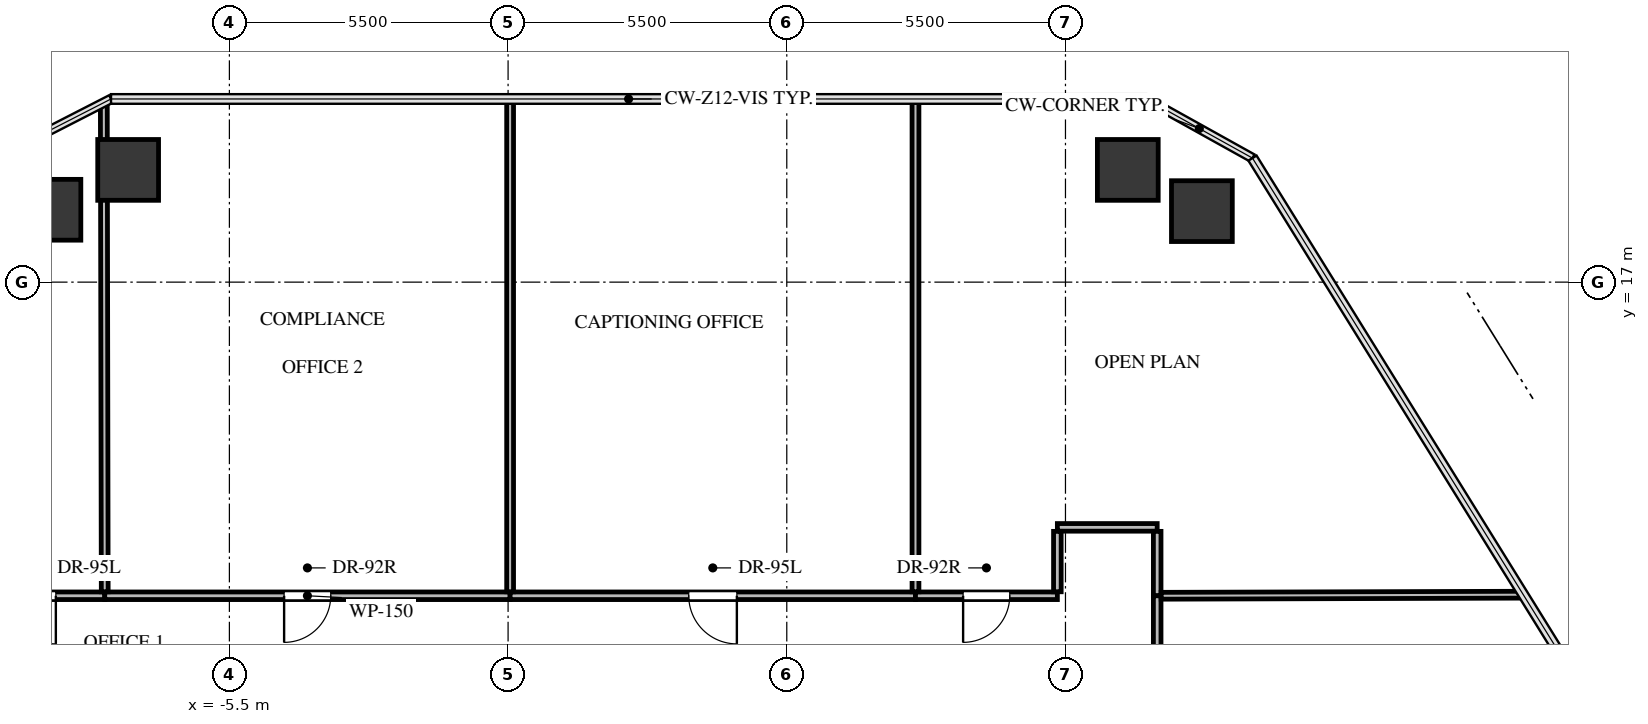
"""IFC4 building model, lengths in metres.
Left out: names, types, materials, properties, quantities, classifications, styles, units other than length and angle.
Written with IfcOpenShell. Run it as: python <this file> out.ifc"""

import sys

from ifc_helpers import new_model, si_unit, direction, frame, frame_2d, origin, origin_2d, place, context, subcontext, project, spatial, rectangle, extrude, source, transform, mapped, element, fill, save


model = new_model("IFC4")
c1 = context("Model", 3, precision=1e-05, world=origin(), true_north=direction((0.0, 1.0)))
c2 = subcontext(c1, "Body", "Model", "MODEL_VIEW")
j1 = project(units=[si_unit("LENGTHUNIT", "METRE"), si_unit("PLANEANGLEUNIT", "RADIAN")], contexts=[c1])
p1 = place(None, origin())
s1 = spatial("IfcSite", under=j1, at=p1, CompositionType="ELEMENT")
p2 = place(p1, origin())
s2 = spatial("IfcBuilding", under=s1, at=p2, CompositionType="ELEMENT")
p3 = place(p2, frame((0.0, 0.0, 146.1)))
s3 = spatial("IfcBuildingStorey", under=s2, at=p3, CompositionType="ELEMENT", Elevation=146.1)
m1 = source(origin(), c2, "Body", "SweptSolid", [
    extrude(rectangle(XDim=1.2, YDim=1.2, at=origin_2d()), origin(), (0.0, 0.0, 1.0), 4.12),
])
for number, where, z_axis, x_axis in (
    (1, (-9.032, 18.428, -0.24), (0.0, 0.0, 1.0), (1.0, 0.0, 0.0)),
    (2, (-7.498, 19.215, -0.24), (0.0, 0.0, 1.0), (1.0, 0.0, 0.0)),
    (3, (12.23, 19.215, -0.24), (0.0, 0.0, 1.0), (1.0, 0.0, 0.0)),
    (4, (13.692, 18.401, -0.24), (0.0, 0.0, 1.0), (1.0, 0.0, 0.0)),
):
    element("IfcColumn", number, at=place(p3, frame(where, z_axis=z_axis, x_axis=x_axis)), inside=s3, PredefinedType="COLUMN", context=c2, shape_type="MappedRepresentation", body=[
        mapped(m1, transform((0.0, 0.0, 0.0), x_axis=(1.0, 0.0, 0.0), y_axis=(0.0, 1.0, 0.0), z_axis=(0.0, 0.0, 1.0), scale=1.0)),
    ])
p4 = place(p3, frame((-7.96, 10.81, 0.0), z_axis=(0.0, 0.0, 1.0), x_axis=(-1.0, 0.0, 0.0)))
e5 = element("IfcWall", 5, at=p4, inside=s3, PredefinedType="PARTITIONING", context=c2, shape_type="SweptSolid", body=[
    extrude(rectangle(XDim=2.88, YDim=0.15, at=frame_2d((1.44, 0.0))), origin(), (0.0, 0.0, 1.0), 3.865),
])
p5 = place(p4, frame((0.965, 0.0, 0.0)))
e6 = element("IfcOpeningElement", 6, at=p5, cuts=e5, PredefinedType="OPENING", context=c2, shape_type="SweptSolid", body=[
    extrude(rectangle(XDim=0.95, YDim=2.1, at=frame_2d((0.475, 1.05))), frame((0.0, 0.085, 0.0), z_axis=(0.0, -1.0, 0.0), x_axis=(1.0, 0.0, 0.0)), (0.0, 0.0, 1.0), 0.17),
])
p6 = place(p3, frame((0.04, 10.81, 0.0), z_axis=(0.0, 0.0, 1.0), x_axis=(-1.0, 0.0, 0.0)))
e7 = element("IfcWall", 7, at=p6, inside=s3, PredefinedType="PARTITIONING", context=c2, shape_type="SweptSolid", body=[
    extrude(rectangle(XDim=8.0, YDim=0.15, at=frame_2d((4.0, 0.0))), origin(), (0.0, 0.0, 1.0), 2.3),
])
p7 = place(p6, frame((3.54, 0.0, 0.0)))
e8 = element("IfcOpeningElement", 8, at=p7, cuts=e7, PredefinedType="OPENING", context=c2, shape_type="SweptSolid", body=[
    extrude(rectangle(XDim=0.92, YDim=2.1, at=frame_2d((0.46, 1.05))), frame((0.0, 0.085, 0.0), z_axis=(0.0, -1.0, 0.0), x_axis=(1.0, 0.0, 0.0)), (0.0, 0.0, 1.0), 0.17),
])
p8 = place(p3, frame((8.04, 10.81, 0.0), z_axis=(0.0, 0.0, 1.0), x_axis=(-1.0, 0.0, 0.0)))
e9 = element("IfcWall", 9, at=p8, inside=s3, PredefinedType="PARTITIONING", context=c2, shape_type="SweptSolid", body=[
    extrude(rectangle(XDim=8.0, YDim=0.15, at=frame_2d((4.0, 0.0))), origin(), (0.0, 0.0, 1.0), 3.223),
])
p9 = place(p8, frame((3.525, 0.0, 0.0)))
e10 = element("IfcOpeningElement", 10, at=p9, cuts=e9, PredefinedType="OPENING", context=c2, shape_type="SweptSolid", body=[
    extrude(rectangle(XDim=0.95, YDim=2.1, at=frame_2d((0.475, 1.05))), frame((0.0, 0.085, 0.0), z_axis=(0.0, -1.0, 0.0), x_axis=(1.0, 0.0, 0.0)), (0.0, 0.0, 1.0), 0.17),
])
p10 = place(p3, frame((10.84, 10.81, 0.0), z_axis=(0.0, 0.0, 1.0), x_axis=(-1.0, 0.0, 0.0)))
e11 = element("IfcWall", 11, at=p10, inside=s3, PredefinedType="PARTITIONING", context=c2, shape_type="SweptSolid", body=[
    extrude(rectangle(XDim=2.8, YDim=0.15, at=frame_2d((1.4, 0.0))), origin(), (0.0, 0.0, 1.0), 2.3),
])
p11 = place(p10, frame((0.94, 0.0, 0.0)))
e12 = element("IfcOpeningElement", 12, at=p11, cuts=e11, PredefinedType="OPENING", context=c2, shape_type="SweptSolid", body=[
    extrude(rectangle(XDim=0.92, YDim=2.1, at=frame_2d((0.46, 1.05))), frame((0.0, 0.085, 0.0), z_axis=(0.0, -1.0, 0.0), x_axis=(1.0, 0.0, 0.0)), (0.0, 0.0, 1.0), 0.17),
])
p12 = place(p3, frame((12.81, 12.16, 0.0), z_axis=(0.0, 0.0, 1.0), x_axis=(-1.0, 0.0, 0.0)))
e13 = element("IfcWall", 13, at=p12, inside=s3, PredefinedType="PARTITIONING", context=c2, shape_type="SweptSolid", body=[
    extrude(rectangle(XDim=1.97, YDim=0.15, at=frame_2d((0.985, 0.0))), origin(), (0.0, 0.0, 1.0), 2.3),
])
p13 = place(p3, frame((12.81, 10.81, 0.0), z_axis=(0.0, 0.0, 1.0), x_axis=(0.0, 1.0, 0.0)))
e14 = element("IfcWall", 14, at=p13, inside=s3, PredefinedType="PARTITIONING", context=c2, shape_type="SweptSolid", body=[
    extrude(rectangle(XDim=1.271, YDim=0.15, at=frame_2d((0.635, 0.0))), origin(), (0.0, 0.0, 1.0), 3.865),
])
p14 = place(p3, frame((10.84, 12.081, 0.0), z_axis=(0.0, 0.0, 1.0), x_axis=(0.0, -1.0, 0.0)))
e15 = element("IfcWall", 15, at=p14, inside=s3, PredefinedType="PARTITIONING", context=c2, shape_type="SweptSolid", body=[
    extrude(rectangle(XDim=1.192, YDim=0.15, at=frame_2d((0.596, 0.0))), origin(), (0.0, 0.0, 1.0), 2.3),
])
p15 = place(p3, frame((12.81, 5.04, 0.0), z_axis=(0.0, 0.0, 1.0), x_axis=(0.0, 1.0, 0.0)))
e16 = element("IfcWall", 16, at=p15, inside=s3, PredefinedType="PARTITIONING", context=c2, shape_type="SweptSolid", body=[
    extrude(rectangle(XDim=5.77, YDim=0.15, at=frame_2d((2.885, 0.0))), origin(), (0.0, 0.0, 1.0), 3.865),
])
p16 = place(p15, frame((2.41, 0.0, 0.0)))
e17 = element("IfcOpeningElement", 17, at=p16, cuts=e16, PredefinedType="OPENING", context=c2, shape_type="SweptSolid", body=[
    extrude(rectangle(XDim=0.95, YDim=2.1, at=frame_2d((0.475, 1.05))), frame((0.0, 0.085, 0.0), z_axis=(0.0, -1.0, 0.0), x_axis=(1.0, 0.0, 0.0)), (0.0, 0.0, 1.0), 0.17),
])
p17 = place(p3, frame((-7.978, 20.542, 0.0), z_axis=(0.0, 0.0, 1.0), x_axis=(0.001871519231, -0.999998248706, 0.0)))
e18 = element("IfcWall", 18, at=p17, inside=s3, PredefinedType="PARTITIONING", context=c2, shape_type="SweptSolid", body=[
    extrude(rectangle(XDim=9.653, YDim=0.135, at=frame_2d((4.827, 0.0))), origin(), (0.0, 0.0, 1.0), 2.3),
])
for number, where, z_axis, x_axis in (
    (19, (0.04, 20.615, 0.0), (0.0, 0.0, 1.0), (0.0, -1.0, 0.0)),
    (20, (8.04, 20.615, 0.0), (0.0, 0.0, 1.0), (0.0, -1.0, 0.0)),
):
    element("IfcWall", number, at=place(p3, frame(where, z_axis=z_axis, x_axis=x_axis)), inside=s3, PredefinedType="PARTITIONING", context=c2, shape_type="SweptSolid", body=[
        extrude(rectangle(XDim=9.726, YDim=0.135, at=frame_2d((4.863, 0.0))), origin(), (0.0, 0.0, 1.0), 2.3),
    ])
p18 = place(p3, frame((20.035, 10.831, 0.0), z_axis=(0.0, 0.0, 1.0), x_axis=(-0.999995783715, -0.002903885812, 0.0)))
e21 = element("IfcWall", 21, at=p18, inside=s3, PredefinedType="PARTITIONING", context=c2, shape_type="SweptSolid", body=[
    extrude(rectangle(XDim=7.146, YDim=0.135, at=frame_2d((3.573, 0.0))), origin(), (0.0, 0.0, 1.0), 2.3),
])
m2 = source(origin(), c2, "Body", "SweptSolid", [
    extrude(rectangle(XDim=0.95, YDim=2.1, at=frame_2d((0.475, 1.05))), frame((0.0, 0.025, 0.0), z_axis=(0.0, -1.0, 0.0), x_axis=(1.0, 0.0, 0.0)), (0.0, 0.0, 1.0), 0.05),
])
p19 = place(p5, origin())
e22 = element("IfcDoor", 22, at=p19, inside=s3, OperationType="SINGLE_SWING_LEFT", PredefinedType="DOOR", context=c2, shape_type="MappedRepresentation", body=[
    mapped(m2, transform((0.0, 0.0, 0.0), x_axis=(1.0, 0.0, 0.0), y_axis=(0.0, 1.0, 0.0), z_axis=(0.0, 0.0, 1.0), scale=1.0)),
])
fill(e6, e22)
m3 = source(origin(), c2, "Body", "SweptSolid", [
    extrude(rectangle(XDim=0.92, YDim=2.1, at=frame_2d((0.46, 1.05))), frame((0.0, 0.025, 0.0), z_axis=(0.0, -1.0, 0.0), x_axis=(1.0, 0.0, 0.0)), (0.0, 0.0, 1.0), 0.05),
])
p20 = place(p7, origin())
e23 = element("IfcDoor", 23, at=p20, inside=s3, OperationType="SINGLE_SWING_RIGHT", PredefinedType="DOOR", context=c2, shape_type="MappedRepresentation", body=[
    mapped(m3, transform((0.0, 0.0, 0.0), x_axis=(1.0, 0.0, 0.0), y_axis=(0.0, 1.0, 0.0), z_axis=(0.0, 0.0, 1.0), scale=1.0)),
])
fill(e8, e23)
p21 = place(p9, origin())
e24 = element("IfcDoor", 24, at=p21, inside=s3, OperationType="SINGLE_SWING_LEFT", PredefinedType="DOOR", context=c2, shape_type="MappedRepresentation", body=[
    mapped(m2, transform((0.0, 0.0, 0.0), x_axis=(1.0, 0.0, 0.0), y_axis=(0.0, 1.0, 0.0), z_axis=(0.0, 0.0, 1.0), scale=1.0)),
])
fill(e10, e24)
p22 = place(p11, origin())
e25 = element("IfcDoor", 25, at=p22, inside=s3, OperationType="SINGLE_SWING_RIGHT", PredefinedType="DOOR", context=c2, shape_type="MappedRepresentation", body=[
    mapped(m3, transform((0.0, 0.0, 0.0), x_axis=(1.0, 0.0, 0.0), y_axis=(0.0, 1.0, 0.0), z_axis=(0.0, 0.0, 1.0), scale=1.0)),
])
fill(e12, e25)
save(model, sys.argv[1])
